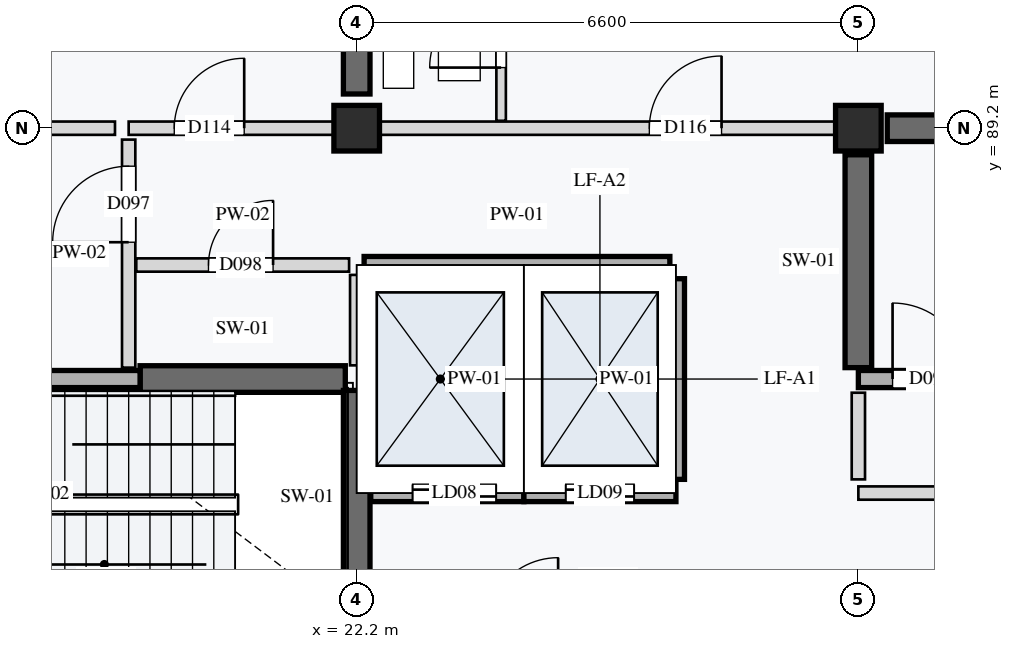
"""IFC4 building model, lengths in metres.
Left out: names, types, materials, properties, quantities, classifications, styles, units other than length and angle.
Written with IfcOpenShell. Run it as: python <this file> out.ifc"""

import sys

from ifc_helpers import new_model, si_unit, direction, frame, frame_2d, origin, origin_2d, place, context, subcontext, project, spatial, rectangle, extrude, element, fill, save


model = new_model("IFC4")
c1 = context("Model", 3, precision=1e-05, world=origin(), true_north=direction((0.0, 1.0)))
c2 = subcontext(c1, "Body", "Model", "MODEL_VIEW")
j1 = project(units=[si_unit("LENGTHUNIT", "METRE"), si_unit("PLANEANGLEUNIT", "RADIAN")], contexts=[c1])
p1 = place(None, origin())
s1 = spatial("IfcSite", under=j1, at=p1, CompositionType="ELEMENT")
p2 = place(p1, origin())
s2 = spatial("IfcBuilding", under=s1, at=p2, CompositionType="ELEMENT")
p3 = place(p2, frame((0.0, 0.0, 11.6)))
s3 = spatial("IfcBuildingStorey", under=s2, at=p3, CompositionType="ELEMENT", Elevation=11.6)
for number, where, z_axis, x_axis in (
    (1, (22.2, 89.2, 0.0), (0.0, 0.0, 1.0), (1.0, 0.0, 0.0)),
    (2, (28.8, 89.2, 0.0), (0.0, 0.0, 1.0), (1.0, 0.0, 0.0)),
):
    element("IfcColumn", number, at=place(p3, frame(where, z_axis=z_axis, x_axis=x_axis)), inside=s3, PredefinedType="COLUMN", context=c2, shape_type="SweptSolid", body=[
        extrude(rectangle(XDim=0.6, YDim=0.6, at=origin_2d()), origin(), (0.0, 0.0, 1.0), 3.2),
    ])
p4 = place(p3, frame((19.35, 85.9, 0.0), z_axis=(0.0, 0.0, 1.0), x_axis=(1.0, 0.0, 0.0)))
e3 = element("IfcWall", 3, at=p4, inside=s3, PredefinedType="SHEAR", context=c2, shape_type="SweptSolid", body=[
    extrude(rectangle(XDim=2.7, YDim=0.35, at=frame_2d((1.35, 0.0))), origin(), (0.0, 0.0, 1.0), 2.96),
])
p5 = place(p3, frame((22.2, 82.95, 0.0), z_axis=(0.0, 0.0, 1.0), x_axis=(0.0, 1.0, 0.0)))
e4 = element("IfcWall", 4, at=p5, inside=s3, PredefinedType="SHEAR", context=c2, shape_type="SweptSolid", body=[
    extrude(rectangle(XDim=2.8, YDim=0.35, at=frame_2d((1.4, 0.0))), origin(), (0.0, 0.0, 1.0), 2.96),
])
p6 = place(p3, frame((29.18, 89.2, 0.0), z_axis=(0.0, 0.0, 1.0), x_axis=(1.0, 0.0, 0.0)))
e5 = element("IfcWall", 5, at=p6, inside=s3, PredefinedType="SHEAR", context=c2, shape_type="SweptSolid", body=[
    extrude(rectangle(XDim=5.84, YDim=0.35, at=frame_2d((2.92, 0.0))), origin(), (0.0, 0.0, 1.0), 2.96),
])
p7 = place(p3, frame((28.8, 86.05, 0.0), z_axis=(0.0, 0.0, 1.0), x_axis=(0.0, 1.0, 0.0)))
e6 = element("IfcWall", 6, at=p7, inside=s3, PredefinedType="SHEAR", context=c2, shape_type="SweptSolid", body=[
    extrude(rectangle(XDim=2.8, YDim=0.35, at=frame_2d((1.4, 0.0))), origin(), (0.0, 0.0, 1.0), 2.96),
])
p8 = place(p3, frame((22.2, 89.65, 0.0), z_axis=(0.0, 0.0, 1.0), x_axis=(0.0, 1.0, 0.0)))
e7 = element("IfcWall", 7, at=p8, inside=s3, PredefinedType="SHEAR", context=c2, shape_type="SweptSolid", body=[
    extrude(rectangle(XDim=5.7, YDim=0.35, at=frame_2d((2.85, 0.0))), origin(), (0.0, 0.0, 1.0), 2.96),
])
p9 = place(p3, frame((15.75, 85.9, 0.0), z_axis=(0.0, 0.0, 1.0), x_axis=(1.0, 0.0, 0.0)))
e8 = element("IfcWall", 8, at=p9, inside=s3, PredefinedType="STANDARD", context=c2, shape_type="SweptSolid", body=[
    extrude(rectangle(XDim=3.6, YDim=0.225, at=frame_2d((1.8, 0.0))), origin(), (0.0, 0.0, 1.0), 2.96),
])
p10 = place(p9, frame((0.45, 0.0, 0.0)))
e9 = element("IfcOpeningElement", 9, at=p10, cuts=e8, PredefinedType="OPENING", context=c2, shape_type="SweptSolid", body=[
    extrude(rectangle(XDim=1.04, YDim=2.12, at=frame_2d((0.52, 1.06))), frame((0.0, 0.123, 0.0), z_axis=(0.0, -1.0, 0.0), x_axis=(1.0, 0.0, 0.0)), (0.0, 0.0, 1.0), 0.245),
])
p11 = place(p3, frame((19.2, 86.05, 0.0), z_axis=(0.0, 0.0, 1.0), x_axis=(0.0, 1.0, 0.0)))
e10 = element("IfcWall", 10, at=p11, inside=s3, PredefinedType="PARTITIONING", context=c2, shape_type="SweptSolid", body=[
    extrude(rectangle(XDim=3.0, YDim=0.175, at=frame_2d((1.5, 0.0))), origin(), (0.0, 0.0, 1.0), 2.96),
])
p12 = place(p11, frame((1.65, 0.0, 0.0)))
e11 = element("IfcOpeningElement", 11, at=p12, cuts=e10, PredefinedType="OPENING", context=c2, shape_type="SweptSolid", body=[
    extrude(rectangle(XDim=1.0, YDim=2.1, at=frame_2d((0.5, 1.05))), frame((0.0, 0.097, 0.0), z_axis=(0.0, -1.0, 0.0), x_axis=(1.0, 0.0, 0.0)), (0.0, 0.0, 1.0), 0.195),
])
p13 = place(p3, frame((19.3, 87.4, 0.0), z_axis=(0.0, 0.0, 1.0), x_axis=(1.0, 0.0, 0.0)))
e12 = element("IfcWall", 12, at=p13, inside=s3, PredefinedType="PARTITIONING", context=c2, shape_type="SweptSolid", body=[
    extrude(rectangle(XDim=2.8, YDim=0.175, at=frame_2d((1.4, 0.0))), origin(), (0.0, 0.0, 1.0), 2.96),
])
p14 = place(p13, frame((0.95, 0.0, 0.0)))
e13 = element("IfcOpeningElement", 13, at=p14, cuts=e12, PredefinedType="OPENING", context=c2, shape_type="SweptSolid", body=[
    extrude(rectangle(XDim=0.85, YDim=2.0, at=frame_2d((0.425, 1.0))), frame((0.0, 0.097, 0.0), z_axis=(0.0, -1.0, 0.0), x_axis=(1.0, 0.0, 0.0)), (0.0, 0.0, 1.0), 0.195),
])
p15 = place(p3, frame((22.2, 86.08, 0.0), z_axis=(0.0, 0.0, 1.0), x_axis=(0.0, 1.0, 0.0)))
e14 = element("IfcWall", 14, at=p15, inside=s3, PredefinedType="PARTITIONING", context=c2, shape_type="SweptSolid", body=[
    extrude(rectangle(XDim=1.19, YDim=0.175, at=frame_2d((0.595, 0.0))), origin(), (0.0, 0.0, 1.0), 2.96),
])
p16 = place(p3, frame((22.385, 84.4, 0.0), z_axis=(0.0, 0.0, 1.0), x_axis=(1.0, 0.0, 0.0)))
e15 = element("IfcWall", 15, at=p16, inside=s3, PredefinedType="STANDARD", context=c2, shape_type="SweptSolid", body=[
    extrude(rectangle(XDim=2.015, YDim=0.225, at=frame_2d((1.007, 0.0))), origin(), (0.0, 0.0, 1.0), 2.96),
])
p17 = place(p16, frame((0.55, 0.0, 0.0)))
e16 = element("IfcOpeningElement", 16, at=p17, cuts=e15, PredefinedType="OPENING", context=c2, shape_type="SweptSolid", body=[
    extrude(rectangle(XDim=1.1, YDim=2.1, at=frame_2d((0.55, 1.05))), frame((0.0, 0.123, 0.0), z_axis=(0.0, -1.0, 0.0), x_axis=(1.0, 0.0, 0.0)), (0.0, 0.0, 1.0), 0.245),
])
p18 = place(p3, frame((24.4, 84.4, 0.0), z_axis=(0.0, 0.0, 1.0), x_axis=(1.0, 0.0, 0.0)))
e17 = element("IfcWall", 17, at=p18, inside=s3, PredefinedType="STANDARD", context=c2, shape_type="SweptSolid", body=[
    extrude(rectangle(XDim=2.0, YDim=0.225, at=frame_2d((1.0, 0.0))), origin(), (0.0, 0.0, 1.0), 2.96),
])
p19 = place(p18, frame((0.55, 0.0, 0.0)))
e18 = element("IfcOpeningElement", 18, at=p19, cuts=e17, PredefinedType="OPENING", context=c2, shape_type="SweptSolid", body=[
    extrude(rectangle(XDim=0.9, YDim=2.1, at=frame_2d((0.45, 1.05))), frame((0.0, 0.123, 0.0), z_axis=(0.0, -1.0, 0.0), x_axis=(1.0, 0.0, 0.0)), (0.0, 0.0, 1.0), 0.245),
])
p20 = place(p3, frame((22.298, 87.4, 0.0), z_axis=(0.0, 0.0, 1.0), x_axis=(1.0, 0.0, 0.0)))
e19 = element("IfcWall", 19, at=p20, inside=s3, PredefinedType="STANDARD", context=c2, shape_type="SweptSolid", body=[
    extrude(rectangle(XDim=4.022, YDim=0.225, at=frame_2d((2.011, 0.0))), origin(), (0.0, 0.0, 1.0), 2.96),
])
for number, where, z_axis, x_axis in (
    (20, (24.4, 84.58, 0.0), (0.0, 0.0, 1.0), (0.0, 1.0, 0.0)),
    (21, (26.4, 84.58, 0.0), (0.0, 0.0, 1.0), (0.0, 1.0, 0.0)),
):
    element("IfcWall", number, at=place(p3, frame(where, z_axis=z_axis, x_axis=x_axis)), inside=s3, PredefinedType="STANDARD", context=c2, shape_type="SweptSolid", body=[
        extrude(rectangle(XDim=2.64, YDim=0.225, at=frame_2d((1.32, 0.0))), origin(), (0.0, 0.0, 1.0), 2.96),
    ])
p21 = place(p3, frame((28.8, 85.9, 0.0), z_axis=(0.0, 0.0, 1.0), x_axis=(1.0, 0.0, 0.0)))
e22 = element("IfcWall", 22, at=p21, inside=s3, PredefinedType="STANDARD", context=c2, shape_type="SweptSolid", body=[
    extrude(rectangle(XDim=3.45, YDim=0.225, at=frame_2d((1.725, 0.0))), origin(), (0.0, 0.0, 1.0), 2.96),
])
p22 = place(p21, frame((0.45, 0.0, 0.0)))
e23 = element("IfcOpeningElement", 23, at=p22, cuts=e22, PredefinedType="OPENING", context=c2, shape_type="SweptSolid", body=[
    extrude(rectangle(XDim=1.0, YDim=2.16, at=frame_2d((0.5, 1.08))), frame((0.0, 0.123, 0.0), z_axis=(0.0, -1.0, 0.0), x_axis=(1.0, 0.0, 0.0)), (0.0, 0.0, 1.0), 0.245),
])
p23 = place(p3, frame((28.8, 84.4, 0.0), z_axis=(0.0, 0.0, 1.0), x_axis=(1.0, 0.0, 0.0)))
e24 = element("IfcWall", 24, at=p23, inside=s3, PredefinedType="PARTITIONING", context=c2, shape_type="SweptSolid", body=[
    extrude(rectangle(XDim=3.3, YDim=0.175, at=frame_2d((1.65, 0.0))), origin(), (0.0, 0.0, 1.0), 2.96),
])
p24 = place(p23, frame((1.8, 0.0, 0.0)))
e25 = element("IfcOpeningElement", 25, at=p24, cuts=e24, PredefinedType="OPENING", context=c2, shape_type="SweptSolid", body=[
    extrude(rectangle(XDim=1.04, YDim=2.12, at=frame_2d((0.52, 1.06))), frame((0.0, 0.097, 0.0), z_axis=(0.0, -1.0, 0.0), x_axis=(1.0, 0.0, 0.0)), (0.0, 0.0, 1.0), 0.195),
])
p25 = place(p3, frame((28.8, 84.58, 0.0), z_axis=(0.0, 0.0, 1.0), x_axis=(0.0, 1.0, 0.0)))
e26 = element("IfcWall", 26, at=p25, inside=s3, PredefinedType="PARTITIONING", context=c2, shape_type="SweptSolid", body=[
    extrude(rectangle(XDim=1.14, YDim=0.175, at=frame_2d((0.57, 0.0))), origin(), (0.0, 0.0, 1.0), 2.96),
])
p26 = place(p3, frame((15.88, 89.2, 0.0), z_axis=(0.0, 0.0, 1.0), x_axis=(1.0, 0.0, 0.0)))
e27 = element("IfcWall", 27, at=p26, inside=s3, PredefinedType="PARTITIONING", context=c2, shape_type="SweptSolid", body=[
    extrude(rectangle(XDim=3.14, YDim=0.175, at=frame_2d((1.57, 0.0))), origin(), (0.0, 0.0, 1.0), 2.55),
])
p27 = place(p3, frame((19.2, 89.2, 0.0), z_axis=(0.0, 0.0, 1.0), x_axis=(1.0, 0.0, 0.0)))
e28 = element("IfcWall", 28, at=p27, inside=s3, PredefinedType="PARTITIONING", context=c2, shape_type="SweptSolid", body=[
    extrude(rectangle(XDim=3.0, YDim=0.175, at=frame_2d((1.5, 0.0))), origin(), (0.0, 0.0, 1.0), 2.55),
])
p28 = place(p27, frame((0.6, 0.0, 0.0)))
e29 = element("IfcOpeningElement", 29, at=p28, cuts=e28, PredefinedType="OPENING", context=c2, shape_type="SweptSolid", body=[
    extrude(rectangle(XDim=0.92, YDim=2.14, at=frame_2d((0.46, 1.07))), frame((0.0, 0.097, 0.0), z_axis=(0.0, -1.0, 0.0), x_axis=(1.0, 0.0, 0.0)), (0.0, 0.0, 1.0), 0.195),
])
p29 = place(p3, frame((22.2, 89.2, 0.0), z_axis=(0.0, 0.0, 1.0), x_axis=(1.0, 0.0, 0.0)))
e30 = element("IfcWall", 30, at=p29, inside=s3, PredefinedType="PARTITIONING", context=c2, shape_type="SweptSolid", body=[
    extrude(rectangle(XDim=6.6, YDim=0.175, at=frame_2d((3.3, 0.0))), origin(), (0.0, 0.0, 1.0), 2.55),
])
p30 = place(p29, frame((3.85, 0.0, 0.0)))
e31 = element("IfcOpeningElement", 31, at=p30, cuts=e30, PredefinedType="OPENING", context=c2, shape_type="SweptSolid", body=[
    extrude(rectangle(XDim=0.95, YDim=2.1, at=frame_2d((0.475, 1.05))), frame((0.0, 0.097, 0.0), z_axis=(0.0, -1.0, 0.0), x_axis=(1.0, 0.0, 0.0)), (0.0, 0.0, 1.0), 0.195),
])
p31 = place(p3, frame((24.1, 89.298, 0.0), z_axis=(0.0, 0.0, 1.0), x_axis=(0.0, 1.0, 0.0)))
e32 = element("IfcWall", 32, at=p31, inside=s3, PredefinedType="PARTITIONING", context=c2, shape_type="SweptSolid", body=[
    extrude(rectangle(XDim=2.302, YDim=0.125, at=frame_2d((1.151, 0.0))), origin(), (0.0, 0.0, 1.0), 2.96),
])
p32 = place(p31, frame((0.7, 0.0, 0.0)))
e33 = element("IfcOpeningElement", 33, at=p32, cuts=e32, PredefinedType="OPENING", context=c2, shape_type="SweptSolid", body=[
    extrude(rectangle(XDim=0.94, YDim=2.08, at=frame_2d((0.47, 1.04))), frame((0.0, 0.073, 0.0), z_axis=(0.0, -1.0, 0.0), x_axis=(1.0, 0.0, 0.0)), (0.0, 0.0, 1.0), 0.145),
])
p33 = place(p12, origin())
e34 = element("IfcDoor", 34, at=p33, inside=s3, OperationType="SINGLE_SWING_LEFT", PredefinedType="DOOR", context=c2, shape_type="SweptSolid", body=[
    extrude(rectangle(XDim=1.0, YDim=2.1, at=frame_2d((0.5, 1.05))), frame((0.0, 0.025, 0.0), z_axis=(0.0, -1.0, 0.0), x_axis=(1.0, 0.0, 0.0)), (0.0, 0.0, 1.0), 0.05),
])
fill(e11, e34)
p34 = place(p14, origin())
e35 = element("IfcDoor", 35, at=p34, inside=s3, OperationType="SINGLE_SWING_RIGHT", PredefinedType="DOOR", context=c2, shape_type="SweptSolid", body=[
    extrude(rectangle(XDim=0.85, YDim=2.0, at=frame_2d((0.425, 1.0))), frame((0.0, 0.025, 0.0), z_axis=(0.0, -1.0, 0.0), x_axis=(1.0, 0.0, 0.0)), (0.0, 0.0, 1.0), 0.05),
])
fill(e13, e35)
p35 = place(p17, origin())
e36 = element("IfcDoor", 36, at=p35, inside=s3, OperationType="DOUBLE_DOOR_SLIDING", PredefinedType="DOOR", context=c2, shape_type="SweptSolid", body=[
    extrude(rectangle(XDim=1.1, YDim=2.1, at=frame_2d((0.55, 1.05))), frame((0.0, 0.025, 0.0), z_axis=(0.0, -1.0, 0.0), x_axis=(1.0, 0.0, 0.0)), (0.0, 0.0, 1.0), 0.05),
])
fill(e16, e36)
p36 = place(p19, origin())
e37 = element("IfcDoor", 37, at=p36, inside=s3, OperationType="DOUBLE_DOOR_SLIDING", PredefinedType="DOOR", context=c2, shape_type="SweptSolid", body=[
    extrude(rectangle(XDim=0.9, YDim=2.1, at=frame_2d((0.45, 1.05))), frame((0.0, 0.025, 0.0), z_axis=(0.0, -1.0, 0.0), x_axis=(1.0, 0.0, 0.0)), (0.0, 0.0, 1.0), 0.05),
])
fill(e18, e37)
p37 = place(p22, origin())
e38 = element("IfcDoor", 38, at=p37, inside=s3, OperationType="SINGLE_SWING_LEFT", PredefinedType="DOOR", context=c2, shape_type="SweptSolid", body=[
    extrude(rectangle(XDim=1.0, YDim=2.16, at=frame_2d((0.5, 1.08))), frame((0.0, 0.025, 0.0), z_axis=(0.0, -1.0, 0.0), x_axis=(1.0, 0.0, 0.0)), (0.0, 0.0, 1.0), 0.05),
])
fill(e23, e38)
p38 = place(p28, origin())
e39 = element("IfcDoor", 39, at=p38, inside=s3, OperationType="SINGLE_SWING_RIGHT", PredefinedType="DOOR", context=c2, shape_type="SweptSolid", body=[
    extrude(rectangle(XDim=0.92, YDim=2.14, at=frame_2d((0.46, 1.07))), frame((0.0, 0.025, 0.0), z_axis=(0.0, -1.0, 0.0), x_axis=(1.0, 0.0, 0.0)), (0.0, 0.0, 1.0), 0.05),
])
fill(e29, e39)
p39 = place(p30, origin())
e40 = element("IfcDoor", 40, at=p39, inside=s3, OperationType="SINGLE_SWING_RIGHT", PredefinedType="DOOR", context=c2, shape_type="SweptSolid", body=[
    extrude(rectangle(XDim=0.95, YDim=2.1, at=frame_2d((0.475, 1.05))), frame((0.0, 0.025, 0.0), z_axis=(0.0, -1.0, 0.0), x_axis=(1.0, 0.0, 0.0)), (0.0, 0.0, 1.0), 0.05),
])
fill(e31, e40)
p40 = place(p32, origin())
e41 = element("IfcDoor", 41, at=p40, inside=s3, OperationType="SINGLE_SWING_LEFT", PredefinedType="DOOR", context=c2, shape_type="SweptSolid", body=[
    extrude(rectangle(XDim=0.94, YDim=2.08, at=frame_2d((0.47, 1.04))), frame((0.0, 0.025, 0.0), z_axis=(0.0, -1.0, 0.0), x_axis=(1.0, 0.0, 0.0)), (0.0, 0.0, 1.0), 0.05),
])
fill(e33, e41)
save(model, sys.argv[1])
